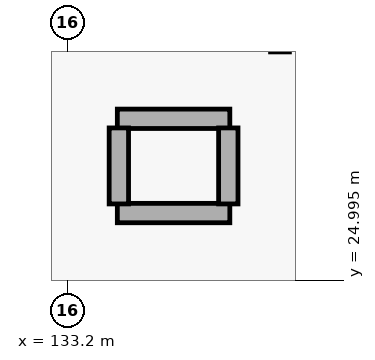
"""IFC4 building model, lengths in metres.
Left out: names, types, materials, properties, quantities, classifications, styles, units other than length and angle.
Written with IfcOpenShell. Run it as: python <this file> out.ifc"""

import sys

from ifc_helpers import new_model, si_unit, direction, frame, frame_2d, origin, place, context, subcontext, project, spatial, rectangle, extrude, element, save


model = new_model("IFC4")
c1 = context("Model", 3, precision=1e-05, world=origin(), true_north=direction((0.0, 1.0)))
c2 = subcontext(c1, "Body", "Model", "MODEL_VIEW")
j1 = project(units=[si_unit("LENGTHUNIT", "METRE"), si_unit("PLANEANGLEUNIT", "RADIAN")], contexts=[c1])
p1 = place(None, origin())
s1 = spatial("IfcSite", under=j1, at=p1, CompositionType="ELEMENT")
p2 = place(p1, origin())
s2 = spatial("IfcBuilding", under=s1, at=p2, CompositionType="ELEMENT")
p3 = place(p2, frame((0.0, 0.0, 10.5)))
s3 = spatial("IfcBuildingStorey", under=s2, at=p3, CompositionType="ELEMENT", Elevation=10.5)
for number, where, z_axis, x_axis in (
    (1, (133.86, 27.12, 0.0), (0.0, 0.0, 1.0), (1.0, 0.0, 0.0)),
    (2, (133.86, 25.88, 0.0), (0.0, 0.0, 1.0), (1.0, 0.0, 0.0)),
):
    element("IfcWall", number, at=place(p3, frame(where, z_axis=z_axis, x_axis=x_axis)), inside=s3, PredefinedType="PARTITIONING", context=c2, shape_type="SweptSolid", body=[
        extrude(rectangle(XDim=1.48, YDim=0.255, at=frame_2d((0.74, 0.0))), origin(), (0.0, 0.0, 1.0), 4.72),
    ])
for number, where, z_axis, x_axis in (
    (3, (133.88, 26.0, 0.0), (0.0, 0.0, 1.0), (0.0, 1.0, 0.0)),
    (4, (135.32, 26.0, 0.0), (0.0, 0.0, 1.0), (0.0, 1.0, 0.0)),
):
    element("IfcWall", number, at=place(p3, frame(where, z_axis=z_axis, x_axis=x_axis)), inside=s3, PredefinedType="PARTITIONING", context=c2, shape_type="SweptSolid", body=[
        extrude(rectangle(XDim=1.0, YDim=0.255, at=frame_2d((0.5, 0.0))), origin(), (0.0, 0.0, 1.0), 4.72),
    ])
save(model, sys.argv[1])
